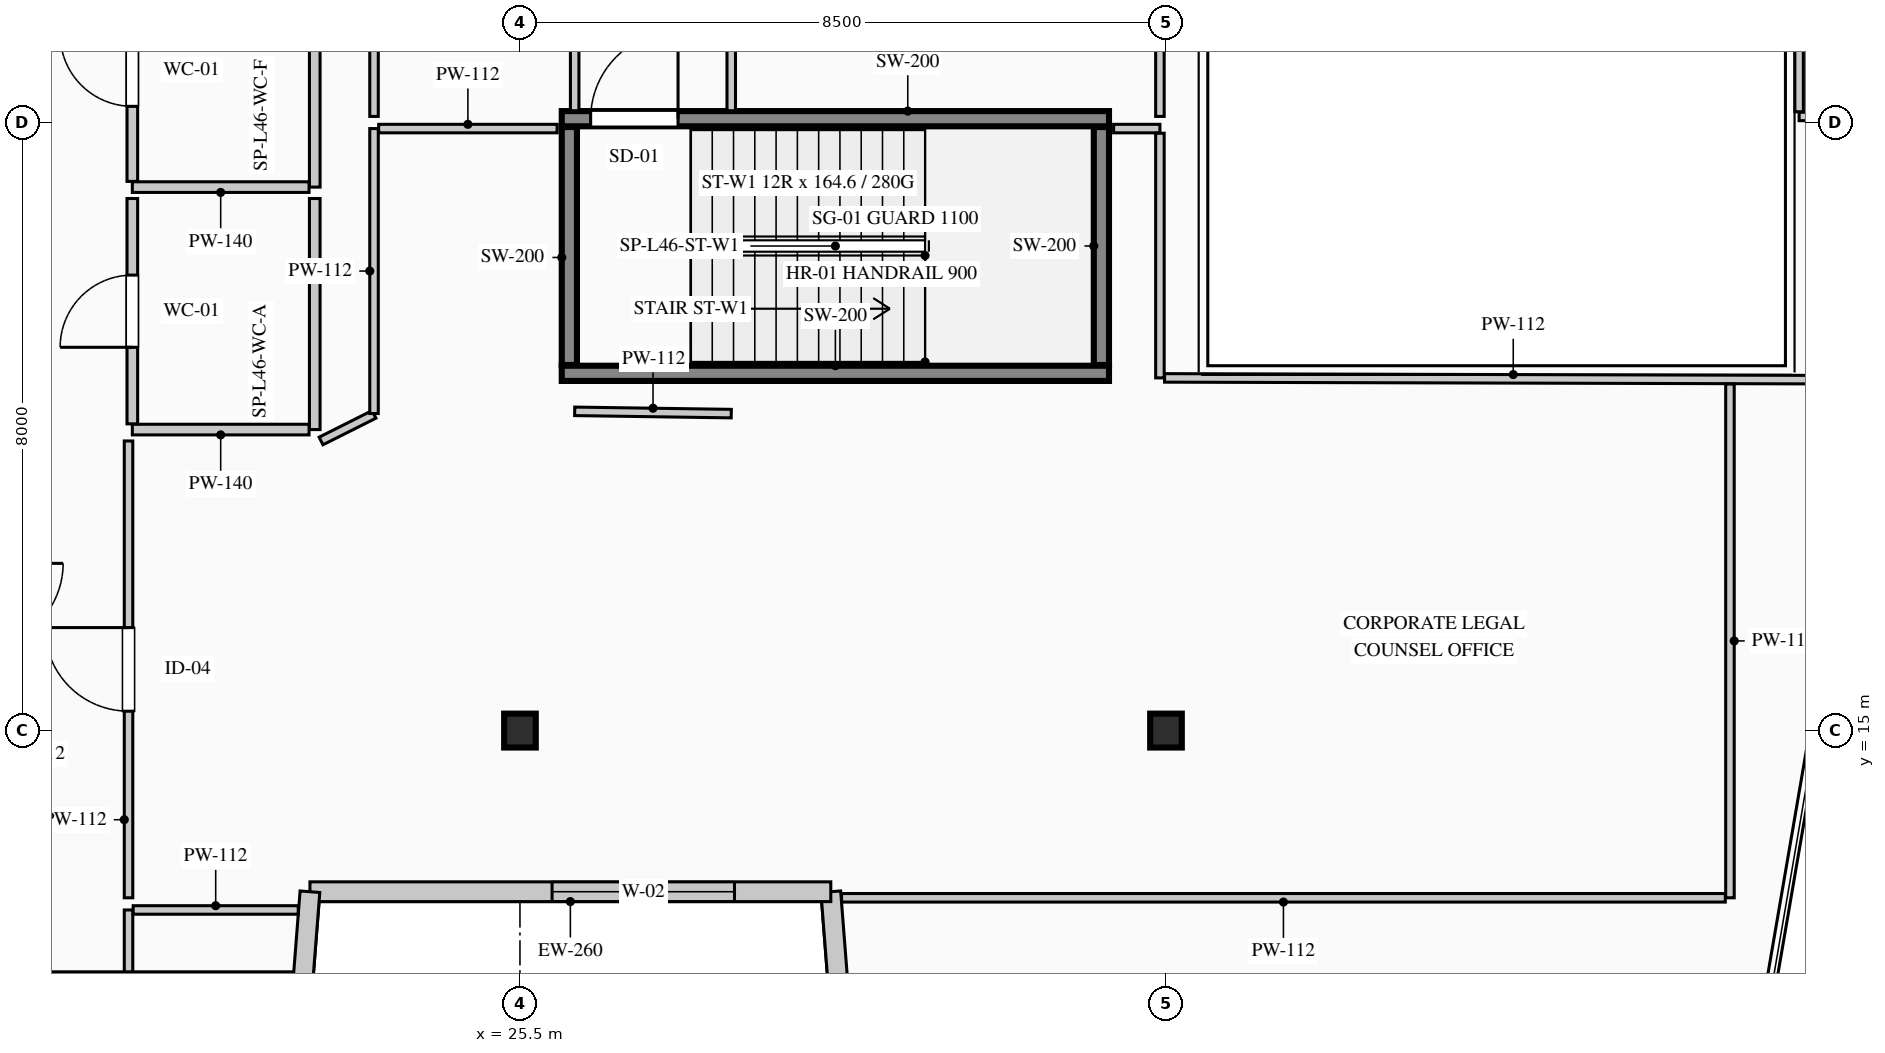
"""IFC4 building model, lengths in metres.
Left out: names, types, materials, properties, quantities, classifications, styles, units other than length and angle.
Written with IfcOpenShell. Run it as: python <this file> out.ifc"""

import sys

from ifc_helpers import new_model, si_unit, direction, frame, frame_2d, origin, origin_2d, place, context, subcontext, project, spatial, rectangle, i_section, extrude, element, fill, save


model = new_model("IFC4")
c1 = context("Model", 3, precision=1e-05, world=origin(), true_north=direction((0.0, 1.0)))
c2 = subcontext(c1, "Body", "Model", "MODEL_VIEW")
j1 = project(units=[si_unit("LENGTHUNIT", "METRE"), si_unit("PLANEANGLEUNIT", "RADIAN")], contexts=[c1])
p1 = place(None, origin())
s1 = spatial("IfcSite", under=j1, at=p1, CompositionType="ELEMENT")
p2 = place(p1, origin())
s2 = spatial("IfcBuilding", under=s1, at=p2, CompositionType="ELEMENT")
p3 = place(p2, frame((0.0, 0.0, 195.6)))
s3 = spatial("IfcBuildingStorey", under=s2, at=p3, CompositionType="ELEMENT", Elevation=195.6)
p4 = place(p3, frame((26.05, 19.7, 0.0), z_axis=(0.0, 0.0, 1.0), x_axis=(1.0, 0.0, 0.0)))
e1 = element("IfcWall", 1, at=p4, inside=s3, PredefinedType="SHEAR", context=c2, shape_type="SweptSolid", body=[
    extrude(rectangle(XDim=7.2, YDim=0.2, at=frame_2d((3.6, 0.0))), origin(), (0.0, 0.0, 1.0), 3.95),
])
p5 = place(p3, frame((26.05, 23.05, 0.0), z_axis=(0.0, 0.0, 1.0), x_axis=(1.0, 0.0, 0.0)))
e2 = element("IfcWall", 2, at=p5, inside=s3, PredefinedType="SHEAR", context=c2, shape_type="SweptSolid", body=[
    extrude(rectangle(XDim=7.2, YDim=0.2, at=frame_2d((3.6, 0.0))), origin(), (0.0, 0.0, 1.0), 3.95),
])
p6 = place(p5, frame((0.38, 0.0, 0.0)))
e3 = element("IfcOpeningElement", 3, at=p6, cuts=e2, PredefinedType="OPENING", context=c2, shape_type="SweptSolid", body=[
    extrude(rectangle(XDim=1.15, YDim=2.2, at=frame_2d((0.575, 1.1))), frame((0.0, 0.11, 0.0), z_axis=(0.0, -1.0, 0.0), x_axis=(1.0, 0.0, 0.0)), (0.0, 0.0, 1.0), 0.22),
])
for number, where, z_axis, x_axis in (
    (4, (26.15, 19.81, 0.0), (0.0, 0.0, 1.0), (0.0, 1.0, 0.0)),
    (5, (33.15, 19.81, 0.0), (0.0, 0.0, 1.0), (0.0, 1.0, 0.0)),
):
    element("IfcWall", number, at=place(p3, frame(where, z_axis=z_axis, x_axis=x_axis)), inside=s3, PredefinedType="SHEAR", context=c2, shape_type="SweptSolid", body=[
        extrude(rectangle(XDim=3.13, YDim=0.2, at=frame_2d((1.565, 0.0))), origin(), (0.0, 0.0, 1.0), 3.95),
    ])
for number, where, z_axis, x_axis in (
    (6, (25.5, 15.0, 0.0), (0.0, 0.0, 1.0), (1.0, 0.0, 0.0)),
    (7, (34.0, 15.0, 0.0), (0.0, 0.0, 1.0), (1.0, 0.0, 0.0)),
):
    element("IfcColumn", number, at=place(p3, frame(where, z_axis=z_axis, x_axis=x_axis)), inside=s3, PredefinedType="COLUMN", context=c2, shape_type="SweptSolid", body=[
        extrude(i_section(OverallWidth=0.416, OverallDepth=0.446, WebThickness=0.039, FlangeThickness=0.063, FilletRadius=0.015, at=origin_2d()), origin(), (0.0, 0.0, 1.0), 3.95),
    ])
p7 = place(p3, frame((30.39, 2.63, 0.0), z_axis=(0.0, 0.0, 1.0), x_axis=(-0.077816860153, 0.996967670627, 0.0)))
e8 = element("IfcWall", 8, at=p7, inside=s3, PredefinedType="STANDARD", context=c2, shape_type="SweptSolid", body=[
    extrude(rectangle(XDim=10.281, YDim=0.26, at=frame_2d((5.141, 0.0))), origin(), (0.0, 0.0, 1.0), 3.7),
])
p8 = place(p7, frame((5.38, 0.0, 0.9)))
e9 = element("IfcOpeningElement", 9, at=p8, cuts=e8, PredefinedType="OPENING", context=c2, shape_type="SweptSolid", body=[
    extrude(rectangle(XDim=2.4, YDim=2.1, at=frame_2d((1.2, 1.05))), frame((0.0, 0.14, 0.0), z_axis=(0.0, -1.0, 0.0), x_axis=(1.0, 0.0, 0.0)), (0.0, 0.0, 1.0), 0.28),
])
p9 = place(p3, frame((29.59, 12.88, 0.0), z_axis=(0.0, 0.0, 1.0), x_axis=(-1.0, 0.0, 0.0)))
e10 = element("IfcWall", 10, at=p9, inside=s3, PredefinedType="STANDARD", context=c2, shape_type="SweptSolid", body=[
    extrude(rectangle(XDim=6.853, YDim=0.26, at=frame_2d((3.426, 0.0))), origin(), (0.0, 0.0, 1.0), 3.7),
])
p10 = place(p9, frame((1.267, 0.0, 0.9)))
e11 = element("IfcOpeningElement", 11, at=p10, cuts=e10, PredefinedType="OPENING", context=c2, shape_type="SweptSolid", body=[
    extrude(rectangle(XDim=2.4, YDim=2.1, at=frame_2d((1.2, 1.05))), frame((0.0, 0.14, 0.0), z_axis=(0.0, -1.0, 0.0), x_axis=(1.0, 0.0, 0.0)), (0.0, 0.0, 1.0), 0.28),
])
p11 = place(p3, frame((22.737, 12.88, 0.0), z_axis=(0.0, 0.0, 1.0), x_axis=(-0.077816860153, -0.996967670627, 0.0)))
e12 = element("IfcWall", 12, at=p11, inside=s3, PredefinedType="STANDARD", context=c2, shape_type="SweptSolid", body=[
    extrude(rectangle(XDim=10.281, YDim=0.26, at=frame_2d((5.141, 0.0))), origin(), (0.0, 0.0, 1.0), 3.7),
])
p12 = place(p11, frame((2.501, 0.0, 0.9)))
e13 = element("IfcOpeningElement", 13, at=p12, cuts=e12, PredefinedType="OPENING", context=c2, shape_type="SweptSolid", body=[
    extrude(rectangle(XDim=2.4, YDim=2.1, at=frame_2d((1.2, 1.05))), frame((0.0, 0.14, 0.0), z_axis=(0.0, -1.0, 0.0), x_axis=(1.0, 0.0, 0.0)), (0.0, 0.0, 1.0), 0.28),
])
p13 = place(p3, frame((22.8, 25.15, 0.0), z_axis=(0.0, 0.0, 1.0), x_axis=(0.0, -1.0, 0.0)))
e14 = element("IfcWall", 14, at=p13, inside=s3, PredefinedType="PARTITIONING", context=c2, shape_type="SweptSolid", body=[
    extrude(rectangle(XDim=3.0, YDim=0.14, at=frame_2d((1.5, 0.0))), origin(), (0.0, 0.0, 1.0), 3.285),
])
p14 = place(p3, frame((22.725, 22.15, 0.0), z_axis=(0.0, 0.0, 1.0), x_axis=(-1.0, 0.0, 0.0)))
e15 = element("IfcWall", 15, at=p14, inside=s3, PredefinedType="PARTITIONING", context=c2, shape_type="SweptSolid", body=[
    extrude(rectangle(XDim=2.325, YDim=0.14, at=frame_2d((1.163, 0.0))), origin(), (0.0, 0.0, 1.0), 3.7),
])
p15 = place(p3, frame((20.4, 22.225, 0.0), z_axis=(0.0, 0.0, 1.0), x_axis=(0.0, 1.0, 0.0)))
e16 = element("IfcWall", 16, at=p15, inside=s3, PredefinedType="PARTITIONING", context=c2, shape_type="SweptSolid", body=[
    extrude(rectangle(XDim=2.925, YDim=0.14, at=frame_2d((1.462, 0.0))), origin(), (0.0, 0.0, 1.0), 3.7),
])
p16 = place(p15, frame((0.988, 0.0, 0.0)))
e17 = element("IfcOpeningElement", 17, at=p16, cuts=e16, PredefinedType="OPENING", context=c2, shape_type="SweptSolid", body=[
    extrude(rectangle(XDim=0.95, YDim=2.15, at=frame_2d((0.475, 1.075))), frame((0.0, 0.08, 0.0), z_axis=(0.0, -1.0, 0.0), x_axis=(1.0, 0.0, 0.0)), (0.0, 0.0, 1.0), 0.16),
])
p17 = place(p3, frame((22.8, 22.0, 0.0), z_axis=(0.0, 0.0, 1.0), x_axis=(0.0, -1.0, 0.0)))
e18 = element("IfcWall", 18, at=p17, inside=s3, PredefinedType="PARTITIONING", context=c2, shape_type="SweptSolid", body=[
    extrude(rectangle(XDim=3.04, YDim=0.14, at=frame_2d((1.52, 0.0))), origin(), (0.0, 0.0, 1.0), 3.285),
])
p18 = place(p3, frame((22.725, 18.96, 0.0), z_axis=(0.0, 0.0, 1.0), x_axis=(-1.0, 0.0, 0.0)))
e19 = element("IfcWall", 19, at=p18, inside=s3, PredefinedType="PARTITIONING", context=c2, shape_type="SweptSolid", body=[
    extrude(rectangle(XDim=2.325, YDim=0.14, at=frame_2d((1.163, 0.0))), origin(), (0.0, 0.0, 1.0), 3.7),
])
p19 = place(p3, frame((20.4, 19.035, 0.0), z_axis=(0.0, 0.0, 1.0), x_axis=(0.0, 1.0, 0.0)))
e20 = element("IfcWall", 20, at=p19, inside=s3, PredefinedType="PARTITIONING", context=c2, shape_type="SweptSolid", body=[
    extrude(rectangle(XDim=2.965, YDim=0.14, at=frame_2d((1.482, 0.0))), origin(), (0.0, 0.0, 1.0), 3.7),
])
p20 = place(p19, frame((1.008, 0.0, 0.0)))
e21 = element("IfcOpeningElement", 21, at=p20, cuts=e20, PredefinedType="OPENING", context=c2, shape_type="SweptSolid", body=[
    extrude(rectangle(XDim=0.95, YDim=2.15, at=frame_2d((0.475, 1.075))), frame((0.0, 0.08, 0.0), z_axis=(0.0, -1.0, 0.0), x_axis=(1.0, 0.0, 0.0)), (0.0, 0.0, 1.0), 0.16),
])
p21 = place(p3, frame((20.35, 11.8, 0.0), z_axis=(0.0, 0.0, 1.0), x_axis=(0.0, 1.0, 0.0)))
e22 = element("IfcWall", 22, at=p21, inside=s3, PredefinedType="PARTITIONING", context=c2, shape_type="SweptSolid", body=[
    extrude(rectangle(XDim=0.84, YDim=0.112, at=frame_2d((0.42, 0.0))), origin(), (0.0, 0.0, 1.0), 3.7),
])
p22 = place(p3, frame((20.411, 12.64, 0.0), z_axis=(0.0, 0.0, 1.0), x_axis=(1.0, 0.0, 0.0)))
e23 = element("IfcWall", 23, at=p22, inside=s3, PredefinedType="PARTITIONING", context=c2, shape_type="SweptSolid", body=[
    extrude(rectangle(XDim=2.172, YDim=0.112, at=frame_2d((1.086, 0.0))), origin(), (0.0, 0.0, 1.0), 3.7),
])
p23 = place(p3, frame((13.341, 11.77, 0.0), z_axis=(0.0, 0.0, 1.0), x_axis=(1.0, 0.0, 0.0)))
e24 = element("IfcWall", 24, at=p23, inside=s3, PredefinedType="PARTITIONING", context=c2, shape_type="SweptSolid", body=[
    extrude(rectangle(XDim=9.174, YDim=0.112, at=frame_2d((4.587, 0.0))), origin(), (0.0, 0.0, 1.0), 3.7),
])
p24 = place(p23, frame((4.037, 0.0, 0.0)))
e25 = element("IfcOpeningElement", 25, at=p24, cuts=e24, PredefinedType="OPENING", context=c2, shape_type="SweptSolid", body=[
    extrude(rectangle(XDim=1.1, YDim=2.2, at=frame_2d((0.55, 1.1))), frame((0.0, 0.066, 0.0), z_axis=(0.0, -1.0, 0.0), x_axis=(1.0, 0.0, 0.0)), (0.0, 0.0, 1.0), 0.132),
])
p25 = place(p3, frame((33.311, 22.92, 0.0), z_axis=(0.0, 0.0, 1.0), x_axis=(1.0, 0.0, 0.0)))
e26 = element("IfcWall", 26, at=p25, inside=s3, PredefinedType="PARTITIONING", context=c2, shape_type="SweptSolid", body=[
    extrude(rectangle(XDim=0.609, YDim=0.112, at=frame_2d((0.305, 0.0))), origin(), (0.0, 0.0, 1.0), 3.7),
])
p26 = place(p3, frame((33.92, 22.859, 0.0), z_axis=(0.0, 0.0, 1.0), x_axis=(0.0, -1.0, 0.0)))
e27 = element("IfcWall", 27, at=p26, inside=s3, PredefinedType="PARTITIONING", context=c2, shape_type="SweptSolid", body=[
    extrude(rectangle(XDim=3.219, YDim=0.112, at=frame_2d((1.609, 0.0))), origin(), (0.0, 0.0, 1.0), 2.885),
])
p27 = place(p3, frame((33.981, 19.64, 0.0), z_axis=(0.0, 0.0, 1.0), x_axis=(0.999996388808, -0.002687447056, 0.0)))
e28 = element("IfcWall", 28, at=p27, inside=s3, PredefinedType="PARTITIONING", context=c2, shape_type="SweptSolid", body=[
    extrude(rectangle(XDim=9.175, YDim=0.112, at=frame_2d((4.588, 0.0))), origin(), (0.0, 0.0, 1.0), 3.7),
])
p28 = place(p3, frame((41.42, 19.559, 0.0), z_axis=(0.0, 0.0, 1.0), x_axis=(0.0, -1.0, 0.0)))
e29 = element("IfcWall", 29, at=p28, inside=s3, PredefinedType="PARTITIONING", context=c2, shape_type="SweptSolid", body=[
    extrude(rectangle(XDim=6.759, YDim=0.112, at=frame_2d((3.379, 0.0))), origin(), (0.0, 0.0, 1.0), 3.7),
])
p29 = place(p3, frame((41.359, 12.8, 0.0), z_axis=(0.0, 0.0, 1.0), x_axis=(-1.0, 0.0, 0.0)))
e30 = element("IfcWall", 30, at=p29, inside=s3, PredefinedType="PARTITIONING", context=c2, shape_type="SweptSolid", body=[
    extrude(rectangle(XDim=11.627, YDim=0.112, at=frame_2d((5.814, 0.0))), origin(), (0.0, 0.0, 1.0), 3.7),
])
p30 = place(p3, frame((20.35, 12.8, 0.0), z_axis=(0.0, 0.0, 1.0), x_axis=(0.0, 1.0, 0.0)))
e31 = element("IfcWall", 31, at=p30, inside=s3, PredefinedType="PARTITIONING", context=c2, shape_type="SweptSolid", body=[
    extrude(rectangle(XDim=6.01, YDim=0.112, at=frame_2d((3.005, 0.0))), origin(), (0.0, 0.0, 1.0), 3.7),
])
p31 = place(p30, frame((2.455, 0.0, 0.0)))
e32 = element("IfcOpeningElement", 32, at=p31, cuts=e31, PredefinedType="OPENING", context=c2, shape_type="SweptSolid", body=[
    extrude(rectangle(XDim=1.1, YDim=2.2, at=frame_2d((0.55, 1.1))), frame((0.0, 0.066, 0.0), z_axis=(0.0, -1.0, 0.0), x_axis=(1.0, 0.0, 0.0)), (0.0, 0.0, 1.0), 0.132),
])
p32 = place(p3, frame((22.883, 18.81, 0.0), z_axis=(0.0, 0.0, 1.0), x_axis=(0.893737436086, 0.448590453909, 0.0)))
e33 = element("IfcWall", 33, at=p32, inside=s3, PredefinedType="PARTITIONING", context=c2, shape_type="SweptSolid", body=[
    extrude(rectangle(XDim=0.78, YDim=0.112, at=frame_2d((0.39, 0.0))), origin(), (0.0, 0.0, 1.0), 3.7),
])
p33 = place(p3, frame((23.58, 19.171, 0.0), z_axis=(0.0, 0.0, 1.0), x_axis=(0.0, 1.0, 0.0)))
e34 = element("IfcWall", 34, at=p33, inside=s3, PredefinedType="PARTITIONING", context=c2, shape_type="SweptSolid", body=[
    extrude(rectangle(XDim=3.749, YDim=0.112, at=frame_2d((1.875, 0.0))), origin(), (0.0, 0.0, 1.0), 3.7),
])
p34 = place(p3, frame((23.641, 22.92, 0.0), z_axis=(0.0, 0.0, 1.0), x_axis=(1.0, 0.0, 0.0)))
e35 = element("IfcWall", 35, at=p34, inside=s3, PredefinedType="PARTITIONING", context=c2, shape_type="SweptSolid", body=[
    extrude(rectangle(XDim=2.348, YDim=0.112, at=frame_2d((1.174, 0.0))), origin(), (0.0, 0.0, 1.0), 3.7),
])
p35 = place(p3, frame((26.22, 19.2, 0.0), z_axis=(0.0, 0.0, 1.0), x_axis=(0.999893773718, -0.014575365509, 0.0)))
e36 = element("IfcWall", 36, at=p35, inside=s3, PredefinedType="PARTITIONING", context=c2, shape_type="SweptSolid", body=[
    extrude(rectangle(XDim=2.06, YDim=0.112, at=frame_2d((1.03, 0.0))), origin(), (0.0, 0.0, 1.0), 3.7),
])
p36 = place(p3, frame((23.58, 23.08, 0.0), z_axis=(0.0, 0.0, 1.0), x_axis=(0.0, 1.0, 0.0)))
e37 = element("IfcWall", 37, at=p36, inside=s3, PredefinedType="PARTITIONING", context=c2, shape_type="SweptSolid", body=[
    extrude(rectangle(XDim=5.94, YDim=0.112, at=frame_2d((2.97, 0.0))), origin(), (0.0, 0.0, 1.0), 3.7),
])
p37 = place(p3, frame((26.22, 28.959, 0.0), z_axis=(0.0, 0.0, 1.0), x_axis=(0.0, -1.0, 0.0)))
e38 = element("IfcWall", 38, at=p37, inside=s3, PredefinedType="PARTITIONING", context=c2, shape_type="SweptSolid", body=[
    extrude(rectangle(XDim=5.804, YDim=0.112, at=frame_2d((2.902, 0.0))), origin(), (0.0, 0.0, 1.0), 3.7),
])
p38 = place(p37, frame((2.352, 0.0, 0.0)))
e39 = element("IfcOpeningElement", 39, at=p38, cuts=e38, PredefinedType="OPENING", context=c2, shape_type="SweptSolid", body=[
    extrude(rectangle(XDim=1.1, YDim=2.2, at=frame_2d((0.55, 1.1))), frame((0.0, 0.066, 0.0), z_axis=(0.0, -1.0, 0.0), x_axis=(1.0, 0.0, 0.0)), (0.0, 0.0, 1.0), 0.132),
])
p39 = place(p3, frame((28.28, 23.155, 0.0), z_axis=(0.0, 0.0, 1.0), x_axis=(0.0, 1.0, 0.0)))
e40 = element("IfcWall", 40, at=p39, inside=s3, PredefinedType="PARTITIONING", context=c2, shape_type="SweptSolid", body=[
    extrude(rectangle(XDim=5.865, YDim=0.112, at=frame_2d((2.933, 0.0))), origin(), (0.0, 0.0, 1.0), 3.7),
])
p40 = place(p39, frame((2.383, 0.0, 0.0)))
e41 = element("IfcOpeningElement", 41, at=p40, cuts=e40, PredefinedType="OPENING", context=c2, shape_type="SweptSolid", body=[
    extrude(rectangle(XDim=1.1, YDim=2.2, at=frame_2d((0.55, 1.1))), frame((0.0, 0.066, 0.0), z_axis=(0.0, -1.0, 0.0), x_axis=(1.0, 0.0, 0.0)), (0.0, 0.0, 1.0), 0.132),
])
p41 = place(p3, frame((33.92, 28.959, 0.0), z_axis=(0.0, 0.0, 1.0), x_axis=(0.0, -1.0, 0.0)))
e42 = element("IfcWall", 42, at=p41, inside=s3, PredefinedType="PARTITIONING", context=c2, shape_type="SweptSolid", body=[
    extrude(rectangle(XDim=5.879, YDim=0.112, at=frame_2d((2.939, 0.0))), origin(), (0.0, 0.0, 1.0), 2.885),
])
p42 = place(p3, frame((43.697, 23.08, 0.0), z_axis=(0.0, 0.0, 1.0), x_axis=(-1.0, 0.0, 0.0)))
e43 = element("IfcWall", 43, at=p42, inside=s3, PredefinedType="PARTITIONING", context=c2, shape_type="SweptSolid", body=[
    extrude(rectangle(XDim=1.366, YDim=0.112, at=frame_2d((0.683, 0.0))), origin(), (0.0, 0.0, 1.0), 3.7),
])
p43 = place(p3, frame((42.33, 23.141, 0.0), z_axis=(0.0, 0.0, 1.0), x_axis=(0.0, 1.0, 0.0)))
e44 = element("IfcWall", 44, at=p43, inside=s3, PredefinedType="PARTITIONING", context=c2, shape_type="SweptSolid", body=[
    extrude(rectangle(XDim=5.489, YDim=0.112, at=frame_2d((2.744, 0.0))), origin(), (0.0, 0.0, 1.0), 3.7),
])
p44 = place(p10, origin())
e45 = element("IfcWindow", 45, at=p44, inside=s3, PartitioningType="DOUBLE_PANEL_VERTICAL", PredefinedType="WINDOW", context=c2, shape_type="SweptSolid", body=[
    extrude(rectangle(XDim=2.4, YDim=2.1, at=frame_2d((1.2, 1.05))), frame((0.0, 0.03, 0.0), z_axis=(0.0, -1.0, 0.0), x_axis=(1.0, 0.0, 0.0)), (0.0, 0.0, 1.0), 0.06),
])
fill(e11, e45)
p45 = place(p6, origin())
e46 = element("IfcDoor", 46, at=p45, inside=s3, OperationType="SINGLE_SWING_RIGHT", PredefinedType="DOOR", context=c2, shape_type="SweptSolid", body=[
    extrude(rectangle(XDim=1.15, YDim=2.2, at=frame_2d((0.575, 1.1))), frame((0.0, 0.025, 0.0), z_axis=(0.0, -1.0, 0.0), x_axis=(1.0, 0.0, 0.0)), (0.0, 0.0, 1.0), 0.05),
])
fill(e3, e46)
p46 = place(p16, origin())
e47 = element("IfcDoor", 47, at=p46, inside=s3, OperationType="SINGLE_SWING_RIGHT", PredefinedType="DOOR", context=c2, shape_type="SweptSolid", body=[
    extrude(rectangle(XDim=0.95, YDim=2.15, at=frame_2d((0.475, 1.075))), frame((0.0, 0.025, 0.0), z_axis=(0.0, -1.0, 0.0), x_axis=(1.0, 0.0, 0.0)), (0.0, 0.0, 1.0), 0.05),
])
fill(e17, e47)
p47 = place(p20, origin())
e48 = element("IfcDoor", 48, at=p47, inside=s3, OperationType="SINGLE_SWING_LEFT", PredefinedType="DOOR", context=c2, shape_type="SweptSolid", body=[
    extrude(rectangle(XDim=0.95, YDim=2.15, at=frame_2d((0.475, 1.075))), frame((0.0, 0.025, 0.0), z_axis=(0.0, -1.0, 0.0), x_axis=(1.0, 0.0, 0.0)), (0.0, 0.0, 1.0), 0.05),
])
fill(e21, e48)
p48 = place(p31, origin())
e49 = element("IfcDoor", 49, at=p48, inside=s3, OperationType="SINGLE_SWING_RIGHT", PredefinedType="DOOR", context=c2, shape_type="SweptSolid", body=[
    extrude(rectangle(XDim=1.1, YDim=2.2, at=frame_2d((0.55, 1.1))), frame((0.0, 0.025, 0.0), z_axis=(0.0, -1.0, 0.0), x_axis=(1.0, 0.0, 0.0)), (0.0, 0.0, 1.0), 0.05),
])
fill(e32, e49)
save(model, sys.argv[1])
